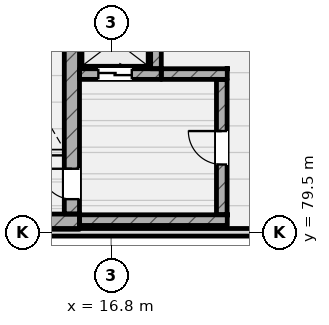
"""IFC4 building model, lengths in metres.
Left out: names, types, materials, properties, quantities, classifications, styles, units other than length and angle.
Written with IfcOpenShell. Run it as: python <this file> out.ifc"""

import sys

from ifc_helpers import new_model, si_unit, direction, frame, frame_2d, origin, place, context, subcontext, project, spatial, rectangle, extrude, element, fill, save


model = new_model("IFC4")
c1 = context("Model", 3, precision=1e-05, world=origin(), true_north=direction((0.0, 1.0)))
c2 = subcontext(c1, "Body", "Model", "MODEL_VIEW")
j1 = project(units=[si_unit("LENGTHUNIT", "METRE"), si_unit("PLANEANGLEUNIT", "RADIAN")], contexts=[c1])
p1 = place(None, origin())
s1 = spatial("IfcSite", under=j1, at=p1, CompositionType="ELEMENT")
p2 = place(p1, origin())
s2 = spatial("IfcBuilding", under=s1, at=p2, CompositionType="ELEMENT")
p3 = place(p2, frame((0.0, 0.0, 51.6)))
s3 = spatial("IfcBuildingStorey", under=s2, at=p3, CompositionType="ELEMENT", Elevation=51.6)
p4 = place(p3, frame((10.6, 79.85, 0.0), z_axis=(0.0, 0.0, 1.0), x_axis=(1.0, 0.0, 0.0)))
e1 = element("IfcWall", 1, at=p4, inside=s3, PredefinedType="SHEAR", context=c2, shape_type="SweptSolid", body=[
    extrude(rectangle(XDim=5.16, YDim=0.5, at=frame_2d((2.58, 0.0))), origin(), (0.0, 0.0, 1.0), 2.8),
])
p5 = place(p3, frame((15.51, 80.1, 0.0), z_axis=(0.0, 0.0, 1.0), x_axis=(0.0, 1.0, 0.0)))
e2 = element("IfcWall", 2, at=p5, inside=s3, PredefinedType="SHEAR", context=c2, shape_type="SweptSolid", body=[
    extrude(rectangle(XDim=9.112, YDim=0.5, at=frame_2d((4.556, 0.0))), origin(), (0.0, 0.0, 1.0), 2.8),
])
p6 = place(p5, frame((0.49, 0.0, 0.0)))
e3 = element("IfcOpeningElement", 3, at=p6, cuts=e2, PredefinedType="OPENING", context=c2, shape_type="SweptSolid", body=[
    extrude(rectangle(XDim=1.0, YDim=2.15, at=frame_2d((0.5, 1.075))), frame((0.0, 0.26, 0.0), z_axis=(0.0, -1.0, 0.0), x_axis=(1.0, 0.0, 0.0)), (0.0, 0.0, 1.0), 0.52),
])
p7 = place(p3, frame((0.0, 79.5, 0.0), z_axis=(0.0, 0.0, 1.0), x_axis=(1.0, 0.0, 0.0)))
e4 = element("IfcWall", 4, at=p7, inside=s3, PredefinedType="PARAPET", context=c2, shape_type="SweptSolid", body=[
    extrude(rectangle(XDim=25.2, YDim=0.25, at=frame_2d((12.6, 0.0))), origin(), (0.0, 0.0, 1.0), 1.2),
])
p8 = place(p3, frame((15.76, 84.705, 0.0), z_axis=(0.0, 0.0, 1.0), x_axis=(1.0, 0.0, 0.0)))
e5 = element("IfcWall", 5, at=p8, inside=s3, PredefinedType="SHEAR", context=c2, shape_type="SweptSolid", body=[
    extrude(rectangle(XDim=2.69, YDim=0.35, at=frame_2d((1.345, 0.0))), origin(), (0.0, 0.0, 1.0), 3.6),
])
p9 = place(p8, frame((0.62, 0.0, 0.0)))
e6 = element("IfcOpeningElement", 6, at=p9, cuts=e5, PredefinedType="OPENING", context=c2, shape_type="SweptSolid", body=[
    extrude(rectangle(XDim=1.1, YDim=2.2, at=frame_2d((0.55, 1.1))), frame((0.0, 0.185, 0.0), z_axis=(0.0, -1.0, 0.0), x_axis=(1.0, 0.0, 0.0)), (0.0, 0.0, 1.0), 0.37),
])
p10 = place(p3, frame((18.275, 84.88, 0.0), z_axis=(0.0, 0.0, 1.0), x_axis=(0.0, 1.0, 0.0)))
e7 = element("IfcWall", 7, at=p10, inside=s3, PredefinedType="SHEAR", context=c2, shape_type="SweptSolid", body=[
    extrude(rectangle(XDim=1.84, YDim=0.35, at=frame_2d((0.92, 0.0))), origin(), (0.0, 0.0, 1.0), 3.6),
])
p11 = place(p3, frame((15.76, 79.9, 0.0), z_axis=(0.0, 0.0, 1.0), x_axis=(1.0, 0.0, 0.0)))
e8 = element("IfcWall", 8, at=p11, inside=s3, PredefinedType="SHEAR", context=c2, shape_type="SweptSolid", body=[
    extrude(rectangle(XDim=4.86, YDim=0.35, at=frame_2d((2.43, 0.0))), origin(), (0.0, 0.0, 1.0), 2.6),
])
p12 = place(p3, frame((18.45, 84.705, 0.0), z_axis=(0.0, 0.0, 1.0), x_axis=(1.0, 0.0, 0.0)))
e9 = element("IfcWall", 9, at=p12, inside=s3, PredefinedType="SHEAR", context=c2, shape_type="SweptSolid", body=[
    extrude(rectangle(XDim=2.17, YDim=0.35, at=frame_2d((1.085, 0.0))), origin(), (0.0, 0.0, 1.0), 2.6),
])
p13 = place(p3, frame((20.44, 80.08, 0.0), z_axis=(0.0, 0.0, 1.0), x_axis=(0.0, 1.0, 0.0)))
e10 = element("IfcWall", 10, at=p13, inside=s3, PredefinedType="SHEAR", context=c2, shape_type="SweptSolid", body=[
    extrude(rectangle(XDim=4.45, YDim=0.35, at=frame_2d((2.225, 0.0))), origin(), (0.0, 0.0, 1.0), 2.6),
])
p14 = place(p13, frame((1.65, 0.0, 0.0)))
e11 = element("IfcOpeningElement", 11, at=p14, cuts=e10, PredefinedType="OPENING", context=c2, shape_type="SweptSolid", body=[
    extrude(rectangle(XDim=1.1, YDim=2.2, at=frame_2d((0.55, 1.1))), frame((0.0, 0.185, 0.0), z_axis=(0.0, -1.0, 0.0), x_axis=(1.0, 0.0, 0.0)), (0.0, 0.0, 1.0), 0.37),
])
p15 = place(p6, origin())
e12 = element("IfcDoor", 12, at=p15, inside=s3, OperationType="SINGLE_SWING_RIGHT", PredefinedType="DOOR", context=c2, shape_type="SweptSolid", body=[
    extrude(rectangle(XDim=1.0, YDim=2.15, at=frame_2d((0.5, 1.075))), frame((0.0, 0.025, 0.0), z_axis=(0.0, -1.0, 0.0), x_axis=(1.0, 0.0, 0.0)), (0.0, 0.0, 1.0), 0.05),
])
fill(e3, e12)
p16 = place(p9, origin())
e13 = element("IfcDoor", 13, at=p16, inside=s3, OperationType="SLIDING_TO_LEFT", PredefinedType="DOOR", context=c2, shape_type="SweptSolid", body=[
    extrude(rectangle(XDim=1.1, YDim=2.2, at=frame_2d((0.55, 1.1))), frame((0.0, 0.025, 0.0), z_axis=(0.0, -1.0, 0.0), x_axis=(1.0, 0.0, 0.0)), (0.0, 0.0, 1.0), 0.05),
])
fill(e6, e13)
p17 = place(p14, origin())
e14 = element("IfcDoor", 14, at=p17, inside=s3, OperationType="SINGLE_SWING_RIGHT", PredefinedType="DOOR", context=c2, shape_type="SweptSolid", body=[
    extrude(rectangle(XDim=1.1, YDim=2.2, at=frame_2d((0.55, 1.1))), frame((0.0, 0.025, 0.0), z_axis=(0.0, -1.0, 0.0), x_axis=(1.0, 0.0, 0.0)), (0.0, 0.0, 1.0), 0.05),
])
fill(e11, e14)
save(model, sys.argv[1])
